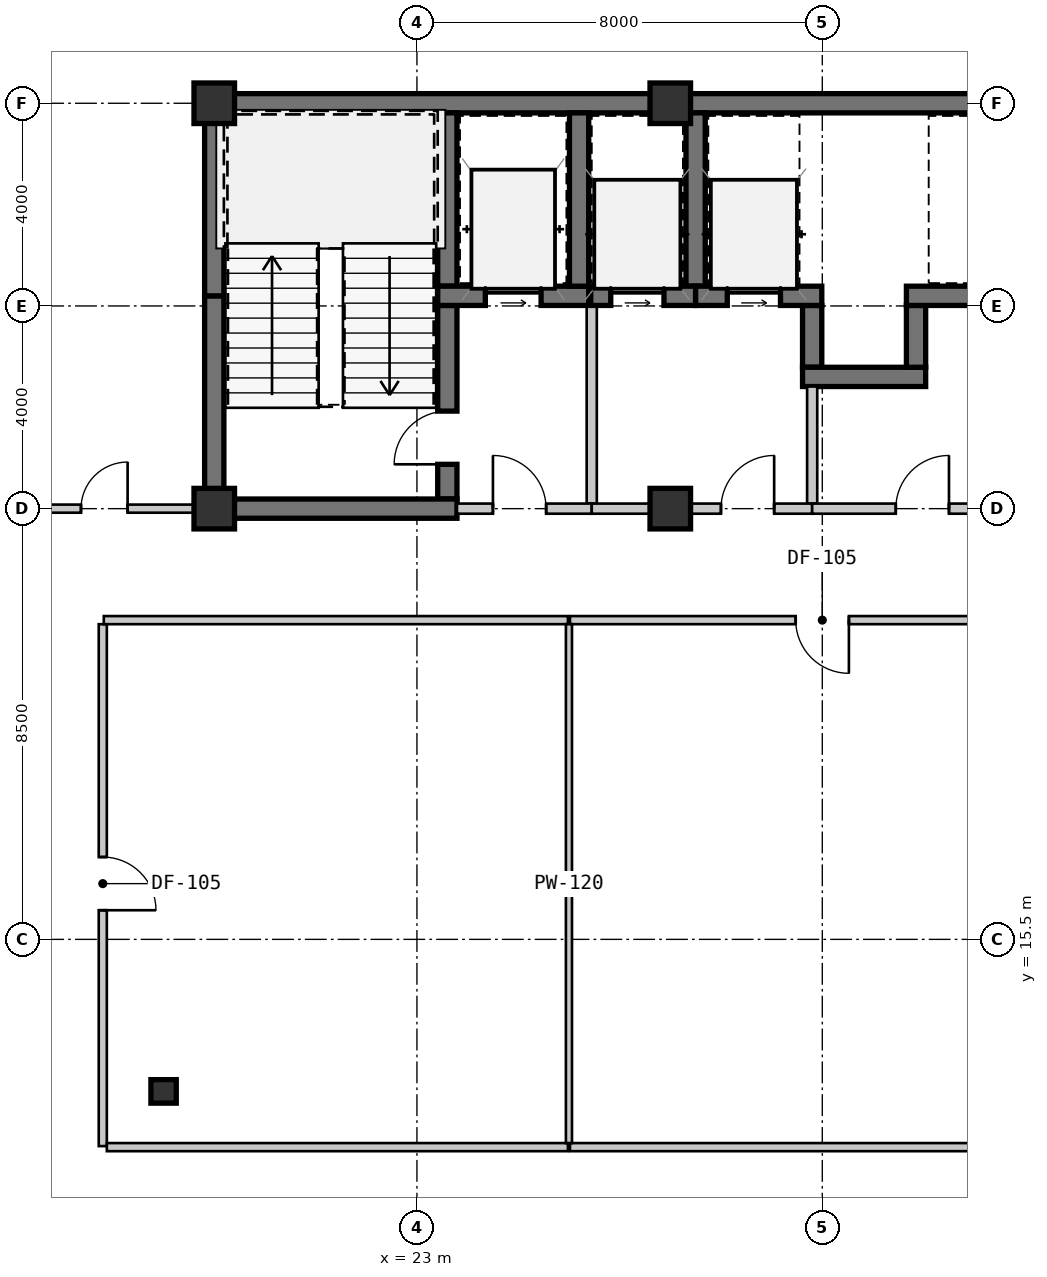
"""IFC4 building model, lengths in metres.
Left out: names, types, materials, properties, quantities, classifications, styles, units other than length and angle.
Written with IfcOpenShell. Run it as: python <this file> out.ifc"""

import sys

from ifc_helpers import new_model, si_unit, direction, frame, frame_2d, origin, origin_2d, place, context, subcontext, project, spatial, rectangle, i_section, extrude, source, transform, mapped, element, fill, save


model = new_model("IFC4")
c1 = context("Model", 3, precision=1e-05, world=origin(), true_north=direction((0.0, 1.0)))
c2 = subcontext(c1, "Body", "Model", "MODEL_VIEW")
j1 = project(units=[si_unit("LENGTHUNIT", "METRE"), si_unit("PLANEANGLEUNIT", "RADIAN")], contexts=[c1])
p1 = place(None, origin())
s1 = spatial("IfcSite", under=j1, at=p1, CompositionType="ELEMENT")
p2 = place(p1, origin())
s2 = spatial("IfcBuilding", under=s1, at=p2, CompositionType="ELEMENT")
p3 = place(p2, frame((0.0, 0.0, 57.75)))
s3 = spatial("IfcBuildingStorey", under=s2, at=p3, CompositionType="ELEMENT", Elevation=57.75)
m1 = source(origin(), c2, "Body", "SweptSolid", [
    extrude(rectangle(XDim=0.8, YDim=0.8, at=origin_2d()), origin(), (0.0, 0.0, 1.0), 3.15),
])
for number, where, z_axis, x_axis in (
    (1, (19.0, 24.0, 0.0), (0.0, 0.0, 1.0), (1.0, 0.0, 0.0)),
    (2, (28.0, 24.0, 0.0), (0.0, 0.0, 1.0), (1.0, 0.0, 0.0)),
    (3, (19.0, 32.0, 0.0), (0.0, 0.0, 1.0), (1.0, 0.0, 0.0)),
    (4, (28.0, 32.0, 0.0), (0.0, 0.0, 1.0), (1.0, 0.0, 0.0)),
):
    element("IfcColumn", number, at=place(p3, frame(where, z_axis=z_axis, x_axis=x_axis)), inside=s3, PredefinedType="COLUMN", context=c2, shape_type="MappedRepresentation", body=[
        mapped(m1, transform((0.0, 0.0, 0.0), scale=1.0)),
    ])
m2 = source(origin(), c2, "Body", "SweptSolid", [
    extrude(i_section(OverallWidth=0.5, OverallDepth=0.464, WebThickness=0.022, FlangeThickness=0.034, at=origin_2d()), origin(), (0.0, 0.0, 1.0), 3.15),
])
p4 = place(p3, frame((18.0, 12.5, 0.0), z_axis=(0.0, 0.0, 1.0), x_axis=(1.0, 0.0, 0.0)))
e5 = element("IfcColumn", 5, at=p4, inside=s3, PredefinedType="COLUMN", context=c2, shape_type="MappedRepresentation", body=[
    mapped(m2, transform((0.0, 0.0, 0.0), scale=1.0)),
])
m3 = source(origin(), c2, "Body", "SweptSolid", [
    extrude(rectangle(XDim=9.19, YDim=0.38, at=frame_2d((4.595, 0.0))), origin(), (0.0, 0.0, 1.0), 2.87),
])
p5 = place(p3, frame((18.81, 32.0, 0.0), z_axis=(0.0, 0.0, 1.0), x_axis=(1.0, 0.0, 0.0)))
e6 = element("IfcWall", 6, at=p5, inside=s3, PredefinedType="SHEAR", context=c2, shape_type="MappedRepresentation", body=[
    mapped(m3, transform((0.0, 0.0, 0.0), scale=1.0)),
])
m4 = source(origin(), c2, "Body", "SweptSolid", [
    extrude(rectangle(XDim=11.2, YDim=0.38, at=frame_2d((5.6, 0.0))), origin(), (0.0, 0.0, 1.0), 2.87),
])
p6 = place(p3, frame((28.0, 32.0, 0.0), z_axis=(0.0, 0.0, 1.0), x_axis=(1.0, 0.0, 0.0)))
e7 = element("IfcWall", 7, at=p6, inside=s3, PredefinedType="SHEAR", context=c2, shape_type="MappedRepresentation", body=[
    mapped(m4, transform((0.0, 0.0, 0.0), scale=1.0)),
])
m5 = source(origin(), c2, "Body", "SweptSolid", [
    extrude(rectangle(XDim=4.01, YDim=0.38, at=frame_2d((2.005, 0.0))), origin(), (0.0, 0.0, 1.0), 2.87),
])
p7 = place(p3, frame((19.0, 24.19, 0.0), z_axis=(0.0, 0.0, 1.0), x_axis=(0.0, 1.0, 0.0)))
e8 = element("IfcWall", 8, at=p7, inside=s3, PredefinedType="SHEAR", context=c2, shape_type="MappedRepresentation", body=[
    mapped(m5, transform((0.0, 0.0, 0.0), scale=1.0)),
])
m6 = source(origin(), c2, "Body", "SweptSolid", [
    extrude(rectangle(XDim=3.61, YDim=0.38, at=frame_2d((1.805, 0.0))), origin(), (0.0, 0.0, 1.0), 2.87),
])
p8 = place(p3, frame((19.0, 28.2, 0.0), z_axis=(0.0, 0.0, 1.0), x_axis=(0.0, 1.0, 0.0)))
e9 = element("IfcWall", 9, at=p8, inside=s3, PredefinedType="SHEAR", context=c2, shape_type="MappedRepresentation", body=[
    mapped(m6, transform((0.0, 0.0, 0.0), scale=1.0)),
])
m7 = source(origin(), c2, "Body", "SweptSolid", [
    extrude(rectangle(XDim=3.42, YDim=0.38, at=frame_2d((1.71, 0.0))), origin(), (0.0, 0.0, 1.0), 2.87),
])
p9 = place(p3, frame((23.6, 28.39, 0.0), z_axis=(0.0, 0.0, 1.0), x_axis=(0.0, 1.0, 0.0)))
e10 = element("IfcWall", 10, at=p9, inside=s3, PredefinedType="SHEAR", context=c2, shape_type="MappedRepresentation", body=[
    mapped(m7, transform((0.0, 0.0, 0.0), scale=1.0)),
])
m8 = source(origin(), c2, "Body", "SweptSolid", [
    extrude(rectangle(XDim=3.82, YDim=0.38, at=frame_2d((1.91, 0.0))), origin(), (0.0, 0.0, 1.0), 2.87),
])
p10 = place(p3, frame((23.6, 24.19, 0.0), z_axis=(0.0, 0.0, 1.0), x_axis=(0.0, 1.0, 0.0)))
e11 = element("IfcWall", 11, at=p10, inside=s3, PredefinedType="SHEAR", context=c2, shape_type="MappedRepresentation", body=[
    mapped(m8, transform((0.0, 0.0, 0.0), scale=1.0)),
])
m9 = source(origin(), c2, "Body", "SweptSolid", [
    extrude(rectangle(XDim=1.05, YDim=2.1, at=frame_2d((0.525, 1.05))), frame((0.0, 0.2, 0.0), z_axis=(0.0, -1.0, 0.0), x_axis=(1.0, 0.0, 0.0)), (0.0, 0.0, 1.0), 0.4),
])
p11 = place(p10, frame((0.685, 0.0, 0.0)))
e12 = element("IfcOpeningElement", 12, at=p11, cuts=e11, PredefinedType="OPENING", context=c2, shape_type="MappedRepresentation", body=[
    mapped(m9, transform((0.0, 0.0, 0.0), scale=1.0)),
])
m10 = source(origin(), c2, "Body", "SweptSolid", [
    extrude(rectangle(XDim=4.98, YDim=0.38, at=frame_2d((2.49, 0.0))), origin(), (0.0, 0.0, 1.0), 2.87),
])
p12 = place(p3, frame((18.81, 24.0, 0.0), z_axis=(0.0, 0.0, 1.0), x_axis=(1.0, 0.0, 0.0)))
e13 = element("IfcWall", 13, at=p12, inside=s3, PredefinedType="SHEAR", context=c2, shape_type="MappedRepresentation", body=[
    mapped(m10, transform((0.0, 0.0, 0.0), scale=1.0)),
])
m11 = source(origin(), c2, "Body", "SweptSolid", [
    extrude(rectangle(XDim=2.98, YDim=0.38, at=frame_2d((1.49, 0.0))), origin(), (0.0, 0.0, 1.0), 2.87),
])
p13 = place(p3, frame((23.41, 28.2, 0.0), z_axis=(0.0, 0.0, 1.0), x_axis=(1.0, 0.0, 0.0)))
e14 = element("IfcWall", 14, at=p13, inside=s3, PredefinedType="SHEAR", context=c2, shape_type="MappedRepresentation", body=[
    mapped(m11, transform((0.0, 0.0, 0.0), scale=1.0)),
])
m12 = source(origin(), c2, "Body", "SweptSolid", [
    extrude(rectangle(XDim=1.1, YDim=2.15, at=frame_2d((0.55, 1.075))), frame((0.0, 0.2, 0.0), z_axis=(0.0, -1.0, 0.0), x_axis=(1.0, 0.0, 0.0)), (0.0, 0.0, 1.0), 0.4),
])
p14 = place(p13, frame((0.94, 0.0, 0.0)))
e15 = element("IfcOpeningElement", 15, at=p14, cuts=e14, PredefinedType="OPENING", context=c2, shape_type="MappedRepresentation", body=[
    mapped(m12, transform((0.0, 0.0, 0.0), scale=1.0)),
])
p15 = place(p3, frame((26.2, 28.39, 0.0), z_axis=(0.0, 0.0, 1.0), x_axis=(0.0, 1.0, 0.0)))
e16 = element("IfcWall", 16, at=p15, inside=s3, PredefinedType="SHEAR", context=c2, shape_type="MappedRepresentation", body=[
    mapped(m7, transform((0.0, 0.0, 0.0), scale=1.0)),
])
m13 = source(origin(), c2, "Body", "SweptSolid", [
    extrude(rectangle(XDim=3.91, YDim=0.2, at=frame_2d((1.955, 0.0))), origin(), (0.0, 0.0, 1.0), 2.87),
])
p16 = place(p3, frame((26.45, 24.1, 0.0), z_axis=(0.0, 0.0, 1.0), x_axis=(0.0, 1.0, 0.0)))
e17 = element("IfcWall", 17, at=p16, inside=s3, PredefinedType="SOLIDWALL", context=c2, shape_type="MappedRepresentation", body=[
    mapped(m13, transform((0.0, 0.0, 0.0), scale=1.0)),
])
m14 = source(origin(), c2, "Body", "SweptSolid", [
    extrude(rectangle(XDim=2.66, YDim=0.2, at=frame_2d((1.33, 0.0))), origin(), (0.0, 0.0, 1.0), 2.41),
])
p17 = place(p3, frame((23.79, 24.0, 0.0), z_axis=(0.0, 0.0, 1.0), x_axis=(1.0, 0.0, 0.0)))
e18 = element("IfcWall", 18, at=p17, inside=s3, PredefinedType="SOLIDWALL", context=c2, shape_type="MappedRepresentation", body=[
    mapped(m14, transform((0.0, 0.0, 0.0), scale=1.0)),
])
m15 = source(origin(), c2, "Body", "SweptSolid", [
    extrude(rectangle(XDim=1.05, YDim=2.1, at=frame_2d((0.525, 1.05))), frame((0.0, 0.11, 0.0), z_axis=(0.0, -1.0, 0.0), x_axis=(1.0, 0.0, 0.0)), (0.0, 0.0, 1.0), 0.22),
])
p18 = place(p17, frame((0.71, 0.0, 0.0)))
e19 = element("IfcOpeningElement", 19, at=p18, cuts=e18, PredefinedType="OPENING", context=c2, shape_type="MappedRepresentation", body=[
    mapped(m15, transform((0.0, 0.0, 0.0), scale=1.0)),
])
m16 = source(origin(), c2, "Body", "SweptSolid", [
    extrude(rectangle(XDim=1.22, YDim=0.38, at=frame_2d((0.61, 0.0))), origin(), (0.0, 0.0, 1.0), 2.87),
])
p19 = place(p3, frame((30.8, 28.01, 0.0), z_axis=(0.0, 0.0, 1.0), x_axis=(0.0, -1.0, 0.0)))
e20 = element("IfcWall", 20, at=p19, inside=s3, PredefinedType="SHEAR", context=c2, shape_type="MappedRepresentation", body=[
    mapped(m16, transform((0.0, 0.0, 0.0), scale=1.0)),
])
m17 = source(origin(), c2, "Body", "SweptSolid", [
    extrude(rectangle(XDim=2.43, YDim=0.38, at=frame_2d((1.215, 0.0))), origin(), (0.0, 0.0, 1.0), 2.87),
])
p20 = place(p3, frame((30.61, 26.6, 0.0), z_axis=(0.0, 0.0, 1.0), x_axis=(1.0, 0.0, 0.0)))
e21 = element("IfcWall", 21, at=p20, inside=s3, PredefinedType="SHEAR", context=c2, shape_type="MappedRepresentation", body=[
    mapped(m17, transform((0.0, 0.0, 0.0), scale=1.0)),
])
p21 = place(p3, frame((32.85, 26.79, 0.0), z_axis=(0.0, 0.0, 1.0), x_axis=(0.0, 1.0, 0.0)))
e22 = element("IfcWall", 22, at=p21, inside=s3, PredefinedType="SHEAR", context=c2, shape_type="MappedRepresentation", body=[
    mapped(m16, transform((0.0, 0.0, 0.0), scale=1.0)),
])
p22 = place(p3, frame((28.5, 28.39, 0.0), z_axis=(0.0, 0.0, 1.0), x_axis=(0.0, 1.0, 0.0)))
e23 = element("IfcWall", 23, at=p22, inside=s3, PredefinedType="SHEAR", context=c2, shape_type="MappedRepresentation", body=[
    mapped(m7, transform((0.0, 0.0, 0.0), scale=1.0)),
])
m18 = source(origin(), c2, "Body", "SweptSolid", [
    extrude(rectangle(XDim=2.07, YDim=0.38, at=frame_2d((1.035, 0.0))), origin(), (0.0, 0.0, 1.0), 2.87),
])
p23 = place(p3, frame((26.43, 28.2, 0.0), z_axis=(0.0, 0.0, 1.0), x_axis=(1.0, 0.0, 0.0)))
e24 = element("IfcWall", 24, at=p23, inside=s3, PredefinedType="SHEAR", context=c2, shape_type="MappedRepresentation", body=[
    mapped(m18, transform((0.0, 0.0, 0.0), scale=1.0)),
])
m19 = source(origin(), c2, "Body", "SweptSolid", [
    extrude(rectangle(XDim=1.05, YDim=2.15, at=frame_2d((0.525, 1.075))), frame((0.0, 0.2, 0.0), z_axis=(0.0, -1.0, 0.0), x_axis=(1.0, 0.0, 0.0)), (0.0, 0.0, 1.0), 0.4),
])
p24 = place(p23, frame((0.395, 0.0, 0.0)))
e25 = element("IfcOpeningElement", 25, at=p24, cuts=e24, PredefinedType="OPENING", context=c2, shape_type="MappedRepresentation", body=[
    mapped(m19, transform((0.0, 0.0, 0.0), scale=1.0)),
])
m20 = source(origin(), c2, "Body", "SweptSolid", [
    extrude(rectangle(XDim=2.49, YDim=0.38, at=frame_2d((1.245, 0.0))), origin(), (0.0, 0.0, 1.0), 2.87),
])
p25 = place(p3, frame((28.5, 28.2, 0.0), z_axis=(0.0, 0.0, 1.0), x_axis=(1.0, 0.0, 0.0)))
e26 = element("IfcWall", 26, at=p25, inside=s3, PredefinedType="SHEAR", context=c2, shape_type="MappedRepresentation", body=[
    mapped(m20, transform((0.0, 0.0, 0.0), scale=1.0)),
])
p26 = place(p25, frame((0.625, 0.0, 0.0)))
e27 = element("IfcOpeningElement", 27, at=p26, cuts=e26, PredefinedType="OPENING", context=c2, shape_type="MappedRepresentation", body=[
    mapped(m19, transform((0.0, 0.0, 0.0), scale=1.0)),
])
m21 = source(origin(), c2, "Body", "SweptSolid", [
    extrude(rectangle(XDim=2.31, YDim=0.2, at=frame_2d((1.155, 0.0))), origin(), (0.0, 0.0, 1.0), 2.87),
])
p27 = place(p3, frame((30.8, 26.41, 0.0), z_axis=(0.0, 0.0, 1.0), x_axis=(0.0, -1.0, 0.0)))
e28 = element("IfcWall", 28, at=p27, inside=s3, PredefinedType="SOLIDWALL", context=c2, shape_type="MappedRepresentation", body=[
    mapped(m21, transform((0.0, 0.0, 0.0), scale=1.0)),
])
m22 = source(origin(), c2, "Body", "SweptSolid", [
    extrude(rectangle(XDim=4.35, YDim=0.2, at=frame_2d((2.175, 0.0))), origin(), (0.0, 0.0, 1.0), 2.41),
])
p28 = place(p3, frame((30.8, 24.0, 0.0), z_axis=(0.0, 0.0, 1.0), x_axis=(-1.0, 0.0, 0.0)))
e29 = element("IfcWall", 29, at=p28, inside=s3, PredefinedType="SOLIDWALL", context=c2, shape_type="MappedRepresentation", body=[
    mapped(m22, transform((0.0, 0.0, 0.0), scale=1.0)),
])
p29 = place(p28, frame((0.75, 0.0, 0.0)))
e30 = element("IfcOpeningElement", 30, at=p29, cuts=e29, PredefinedType="OPENING", context=c2, shape_type="MappedRepresentation", body=[
    mapped(m15, transform((0.0, 0.0, 0.0), scale=1.0)),
])
m23 = source(origin(), c2, "Body", "SweptSolid", [
    extrude(rectangle(XDim=2.68, YDim=0.38, at=frame_2d((1.34, 0.0))), origin(), (0.0, 0.0, 1.0), 2.87),
])
p30 = place(p3, frame((32.66, 28.2, 0.0), z_axis=(0.0, 0.0, 1.0), x_axis=(1.0, 0.0, 0.0)))
e31 = element("IfcWall", 31, at=p30, inside=s3, PredefinedType="SHEAR", context=c2, shape_type="MappedRepresentation", body=[
    mapped(m23, transform((0.0, 0.0, 0.0), scale=1.0)),
])
m24 = source(origin(), c2, "Body", "SweptSolid", [
    extrude(rectangle(XDim=4.35, YDim=0.2, at=frame_2d((2.175, 0.0))), origin(), (0.0, 0.0, 1.0), 2.41),
])
p31 = place(p3, frame((35.15, 24.0, 0.0), z_axis=(0.0, 0.0, 1.0), x_axis=(-1.0, 0.0, 0.0)))
e32 = element("IfcWall", 32, at=p31, inside=s3, PredefinedType="SOLIDWALL", context=c2, shape_type="MappedRepresentation", body=[
    mapped(m24, transform((0.0, 0.0, 0.0), scale=1.0)),
])
p32 = place(p31, frame((1.65, 0.0, 0.0)))
e33 = element("IfcOpeningElement", 33, at=p32, cuts=e32, PredefinedType="OPENING", context=c2, shape_type="MappedRepresentation", body=[
    mapped(m15, transform((0.0, 0.0, 0.0), scale=1.0)),
])
m25 = source(origin(), c2, "Body", "SweptSolid", [
    extrude(rectangle(XDim=10.3, YDim=0.16, at=frame_2d((5.15, 0.0))), origin(), (0.0, 0.0, 1.0), 2.87),
])
p33 = place(p3, frame((16.8, 21.72, 0.0), z_axis=(0.0, 0.0, 1.0), x_axis=(0.0, -1.0, 0.0)))
e34 = element("IfcWall", 34, at=p33, inside=s3, PredefinedType="PARTITIONING", context=c2, shape_type="MappedRepresentation", body=[
    mapped(m25, transform((0.0, 0.0, 0.0), scale=1.0)),
])
m26 = source(origin(), c2, "Body", "SweptSolid", [
    extrude(rectangle(XDim=1.05, YDim=2.1, at=frame_2d((0.525, 1.05))), frame((0.0, 0.09, 0.0), z_axis=(0.0, -1.0, 0.0), x_axis=(1.0, 0.0, 0.0)), (0.0, 0.0, 1.0), 0.18),
])
p34 = place(p33, frame((4.595, 0.0, 0.0)))
e35 = element("IfcOpeningElement", 35, at=p34, cuts=e34, PredefinedType="OPENING", context=c2, shape_type="MappedRepresentation", body=[
    mapped(m26, transform((0.0, 0.0, 0.0), scale=1.0)),
])
m27 = source(origin(), c2, "Body", "SweptSolid", [
    extrude(rectangle(XDim=9.159, YDim=0.16, at=frame_2d((4.58, 0.0))), origin(), (0.0, 0.0, 1.0), 2.87),
])
p35 = place(p3, frame((25.98, 21.8, 0.0), z_axis=(0.0, 0.0, 1.0), x_axis=(-1.0, 0.0, 0.0)))
e36 = element("IfcWall", 36, at=p35, inside=s3, PredefinedType="PARTITIONING", context=c2, shape_type="MappedRepresentation", body=[
    mapped(m27, transform((0.0, 0.0, 0.0), scale=1.0)),
])
m28 = source(origin(), c2, "Body", "SweptSolid", [
    extrude(rectangle(XDim=9.959, YDim=0.16, at=frame_2d((4.98, 0.0))), origin(), (0.0, 0.0, 1.0), 2.87),
])
p36 = place(p3, frame((35.98, 21.8, 0.0), z_axis=(0.0, 0.0, 1.0), x_axis=(-1.0, 0.0, 0.0)))
e37 = element("IfcWall", 37, at=p36, inside=s3, PredefinedType="PARTITIONING", context=c2, shape_type="MappedRepresentation", body=[
    mapped(m28, transform((0.0, 0.0, 0.0), scale=1.0)),
])
p37 = place(p36, frame((4.455, 0.0, 0.0)))
e38 = element("IfcOpeningElement", 38, at=p37, cuts=e37, PredefinedType="OPENING", context=c2, shape_type="MappedRepresentation", body=[
    mapped(m26, transform((0.0, 0.0, 0.0), scale=1.0)),
])
m29 = source(origin(), c2, "Body", "SweptSolid", [
    extrude(rectangle(XDim=4.13, YDim=0.16, at=frame_2d((2.065, 0.0))), origin(), (0.0, 0.0, 1.0), 2.87),
])
p38 = place(p3, frame((14.68, 24.0, 0.0), z_axis=(0.0, 0.0, 1.0), x_axis=(1.0, 0.0, 0.0)))
e39 = element("IfcWall", 39, at=p38, inside=s3, PredefinedType="PARTITIONING", context=c2, shape_type="MappedRepresentation", body=[
    mapped(m29, transform((0.0, 0.0, 0.0), scale=1.0)),
])
m30 = source(origin(), c2, "Body", "SweptSolid", [
    extrude(rectangle(XDim=0.92, YDim=2.1, at=frame_2d((0.46, 1.05))), frame((0.0, 0.09, 0.0), z_axis=(0.0, -1.0, 0.0), x_axis=(1.0, 0.0, 0.0)), (0.0, 0.0, 1.0), 0.18),
])
p39 = place(p38, frame((1.69, 0.0, 0.0)))
e40 = element("IfcOpeningElement", 40, at=p39, cuts=e39, PredefinedType="OPENING", context=c2, shape_type="MappedRepresentation", body=[
    mapped(m30, transform((0.0, 0.0, 0.0), scale=1.0)),
])
m31 = source(origin(), c2, "Body", "SweptSolid", [
    extrude(rectangle(XDim=9.1, YDim=0.16, at=frame_2d((4.55, 0.0))), origin(), (0.0, 0.0, 1.0), 2.87),
])
p40 = place(p3, frame((16.88, 11.4, 0.0), z_axis=(0.0, 0.0, 1.0), x_axis=(1.0, 0.0, 0.0)))
e41 = element("IfcWall", 41, at=p40, inside=s3, PredefinedType="PARTITIONING", context=c2, shape_type="MappedRepresentation", body=[
    mapped(m31, transform((0.0, 0.0, 0.0), scale=1.0)),
])
p41 = place(p3, frame((26.02, 11.4, 0.0), z_axis=(0.0, 0.0, 1.0), x_axis=(1.0, 0.0, 0.0)))
e42 = element("IfcWall", 42, at=p41, inside=s3, PredefinedType="PARTITIONING", context=c2, shape_type="MappedRepresentation", body=[
    mapped(m28, transform((0.0, 0.0, 0.0), scale=1.0)),
])
m32 = source(origin(), c2, "Body", "SweptSolid", [
    extrude(rectangle(XDim=10.24, YDim=0.12, at=frame_2d((5.12, 0.0))), origin(), (0.0, 0.0, 1.0), 2.87),
])
p42 = place(p3, frame((26.0, 21.72, 0.0), z_axis=(0.0, 0.0, 1.0), x_axis=(0.0, -1.0, 0.0)))
e43 = element("IfcWall", 43, at=p42, inside=s3, PredefinedType="PARTITIONING", context=c2, shape_type="MappedRepresentation", body=[
    mapped(m32, transform((0.0, 0.0, 0.0), scale=1.0)),
])
m33 = source(origin(), c2, "Body", "SweptSolid", [
    extrude(rectangle(XDim=1.05, YDim=2.1, at=frame_2d((0.525, 1.05))), frame((0.0, 0.025, 0.0), z_axis=(0.0, -1.0, 0.0), x_axis=(1.0, 0.0, 0.0)), (0.0, 0.0, 1.0), 0.05),
])
p43 = place(p11, origin())
e44 = element("IfcDoor", 44, at=p43, inside=s3, OperationType="SINGLE_SWING_LEFT", PredefinedType="DOOR", context=c2, shape_type="MappedRepresentation", body=[
    mapped(m33, transform((0.0, 0.0, 0.0), scale=1.0)),
])
fill(e12, e44)
m34 = source(origin(), c2, "Body", "SweptSolid", [
    extrude(rectangle(XDim=1.1, YDim=2.15, at=frame_2d((0.55, 1.075))), frame((0.0, 0.025, 0.0), z_axis=(0.0, -1.0, 0.0), x_axis=(1.0, 0.0, 0.0)), (0.0, 0.0, 1.0), 0.05),
])
p44 = place(p14, origin())
e45 = element("IfcDoor", 45, at=p44, inside=s3, OperationType="SLIDING_TO_LEFT", PredefinedType="DOOR", context=c2, shape_type="MappedRepresentation", body=[
    mapped(m34, transform((0.0, 0.0, 0.0), scale=1.0)),
])
fill(e15, e45)
p45 = place(p18, origin())
e46 = element("IfcDoor", 46, at=p45, inside=s3, OperationType="SINGLE_SWING_LEFT", PredefinedType="DOOR", context=c2, shape_type="MappedRepresentation", body=[
    mapped(m33, transform((0.0, 0.0, 0.0), scale=1.0)),
])
fill(e19, e46)
m35 = source(origin(), c2, "Body", "SweptSolid", [
    extrude(rectangle(XDim=1.05, YDim=2.15, at=frame_2d((0.525, 1.075))), frame((0.0, 0.025, 0.0), z_axis=(0.0, -1.0, 0.0), x_axis=(1.0, 0.0, 0.0)), (0.0, 0.0, 1.0), 0.05),
])
p46 = place(p24, origin())
e47 = element("IfcDoor", 47, at=p46, inside=s3, OperationType="SLIDING_TO_LEFT", PredefinedType="DOOR", context=c2, shape_type="MappedRepresentation", body=[
    mapped(m35, transform((0.0, 0.0, 0.0), scale=1.0)),
])
fill(e25, e47)
p47 = place(p26, origin())
e48 = element("IfcDoor", 48, at=p47, inside=s3, OperationType="SLIDING_TO_LEFT", PredefinedType="DOOR", context=c2, shape_type="MappedRepresentation", body=[
    mapped(m35, transform((0.0, 0.0, 0.0), scale=1.0)),
])
fill(e27, e48)
p48 = place(p29, frame((1.05, 0.0, 0.0), z_axis=(0.0, 0.0, 1.0), x_axis=(-1.0, 0.0, 0.0)))
e49 = element("IfcDoor", 49, at=p48, inside=s3, OperationType="SINGLE_SWING_RIGHT", PredefinedType="DOOR", context=c2, shape_type="MappedRepresentation", body=[
    mapped(m33, transform((0.0, 0.0, 0.0), scale=1.0)),
])
fill(e30, e49)
p49 = place(p32, frame((1.05, 0.0, 0.0), z_axis=(0.0, 0.0, 1.0), x_axis=(-1.0, 0.0, 0.0)))
e50 = element("IfcDoor", 50, at=p49, inside=s3, OperationType="SINGLE_SWING_RIGHT", PredefinedType="DOOR", context=c2, shape_type="MappedRepresentation", body=[
    mapped(m33, transform((0.0, 0.0, 0.0), scale=1.0)),
])
fill(e33, e50)
p50 = place(p34, origin())
e51 = element("IfcDoor", 51, at=p50, inside=s3, OperationType="SINGLE_SWING_RIGHT", PredefinedType="DOOR", context=c2, shape_type="MappedRepresentation", body=[
    mapped(m33, transform((0.0, 0.0, 0.0), scale=1.0)),
])
fill(e35, e51)
p51 = place(p37, origin())
e52 = element("IfcDoor", 52, at=p51, inside=s3, OperationType="SINGLE_SWING_LEFT", PredefinedType="DOOR", context=c2, shape_type="MappedRepresentation", body=[
    mapped(m33, transform((0.0, 0.0, 0.0), scale=1.0)),
])
fill(e38, e52)
m36 = source(origin(), c2, "Body", "SweptSolid", [
    extrude(rectangle(XDim=0.92, YDim=2.1, at=frame_2d((0.46, 1.05))), frame((0.0, 0.025, 0.0), z_axis=(0.0, -1.0, 0.0), x_axis=(1.0, 0.0, 0.0)), (0.0, 0.0, 1.0), 0.05),
])
p52 = place(p39, origin())
e53 = element("IfcDoor", 53, at=p52, inside=s3, OperationType="SINGLE_SWING_RIGHT", PredefinedType="DOOR", context=c2, shape_type="MappedRepresentation", body=[
    mapped(m36, transform((0.0, 0.0, 0.0), scale=1.0)),
])
fill(e40, e53)
save(model, sys.argv[1])
